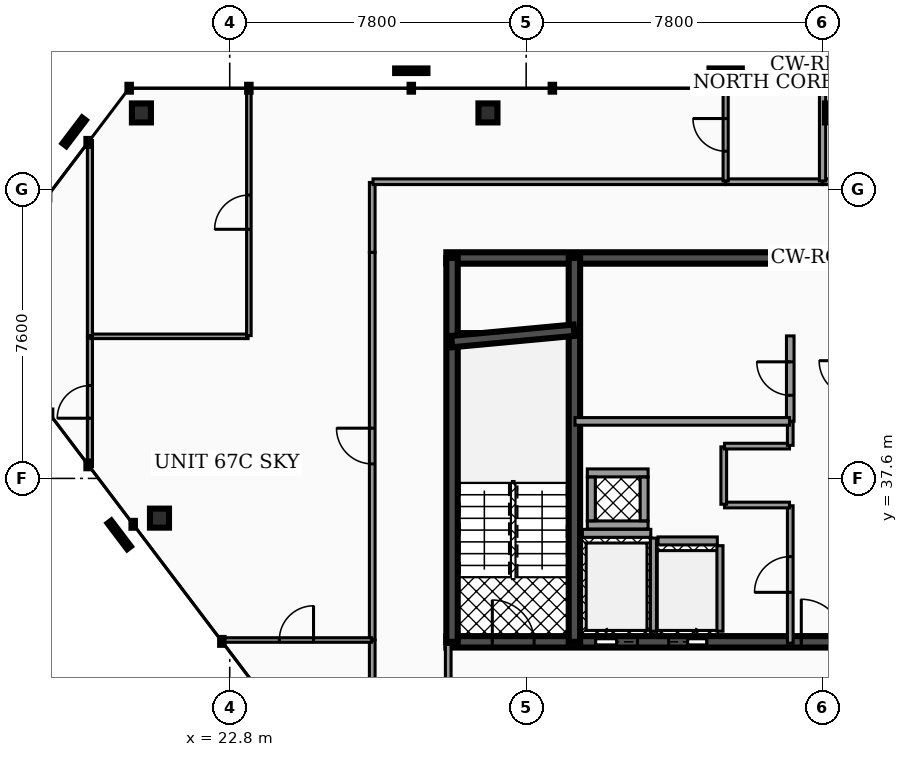
"""IFC4 building model, lengths in metres.
Left out: names, types, materials, properties, quantities, classifications, styles, units other than length and angle.
Written with IfcOpenShell. Run it as: python <this file> out.ifc"""

import sys

from ifc_helpers import new_model, si_unit, direction, frame, frame_2d, origin, origin_2d, place, context, subcontext, project, spatial, rectangle, hollow_rectangle, extrude, element, fill, save


model = new_model("IFC4")
c1 = context("Model", 3, precision=1e-05, world=origin(), true_north=direction((0.0, 1.0)))
c2 = subcontext(c1, "Body", "Model", "MODEL_VIEW")
j1 = project(units=[si_unit("LENGTHUNIT", "METRE"), si_unit("PLANEANGLEUNIT", "RADIAN")], contexts=[c1])
p1 = place(None, origin())
s1 = spatial("IfcSite", under=j1, at=p1, CompositionType="ELEMENT")
p2 = place(p1, origin())
s2 = spatial("IfcBuilding", under=s1, at=p2, CompositionType="ELEMENT")
p3 = place(p2, frame((0.0, 0.0, 265.2)))
s3 = spatial("IfcBuildingStorey", under=s2, at=p3, CompositionType="ELEMENT", Elevation=265.2)
p4 = place(p3, frame((28.5, 43.4, 0.0), z_axis=(0.0, 0.0, 1.0), x_axis=(1.0, 0.0, 0.0)))
e1 = element("IfcWall", 1, at=p4, inside=s3, PredefinedType="SHEAR", context=c2, shape_type="SweptSolid", body=[
    extrude(rectangle(XDim=19.86, YDim=0.3, at=frame_2d((9.93, 0.0))), origin(), (0.0, 0.0, 1.0), 3.18),
])
p5 = place(p3, frame((28.5, 33.3, 0.0), z_axis=(0.0, 0.0, 1.0), x_axis=(1.0, 0.0, 0.0)))
e2 = element("IfcWall", 2, at=p5, inside=s3, PredefinedType="SHEAR", context=c2, shape_type="SweptSolid", body=[
    extrude(rectangle(XDim=19.86, YDim=0.3, at=frame_2d((9.93, 0.0))), origin(), (0.0, 0.0, 1.0), 3.18),
])
p6 = place(p5, frame((3.93, 0.0, 0.0)))
e3 = element("IfcOpeningElement", 3, at=p6, cuts=e2, PredefinedType="OPENING", context=c2, shape_type="SweptSolid", body=[
    extrude(rectangle(XDim=1.1, YDim=2.15, at=frame_2d((0.55, 1.075))), frame((0.0, 0.16, 0.0), z_axis=(0.0, -1.0, 0.0), x_axis=(1.0, 0.0, 0.0)), (0.0, 0.0, 1.0), 0.32),
])
p7 = place(p5, frame((14.77, 0.0, 0.0)))
e4 = element("IfcOpeningElement", 4, at=p7, cuts=e2, PredefinedType="OPENING", context=c2, shape_type="SweptSolid", body=[
    extrude(rectangle(XDim=1.1, YDim=2.15, at=frame_2d((0.55, 1.075))), frame((0.0, 0.16, 0.0), z_axis=(0.0, -1.0, 0.0), x_axis=(1.0, 0.0, 0.0)), (0.0, 0.0, 1.0), 0.32),
])
p8 = place(p5, frame((11.25, 0.0, 0.0)))
e5 = element("IfcOpeningElement", 5, at=p8, cuts=e2, PredefinedType="OPENING", context=c2, shape_type="SweptSolid", body=[
    extrude(rectangle(XDim=1.0, YDim=2.1, at=frame_2d((0.5, 1.05))), frame((0.0, 0.16, 0.0), z_axis=(0.0, -1.0, 0.0), x_axis=(1.0, 0.0, 0.0)), (0.0, 0.0, 1.0), 0.32),
])
p9 = place(p5, frame((12.95, 0.0, 0.0)))
e6 = element("IfcOpeningElement", 6, at=p9, cuts=e2, PredefinedType="OPENING", context=c2, shape_type="SweptSolid", body=[
    extrude(rectangle(XDim=1.0, YDim=2.1, at=frame_2d((0.5, 1.05))), frame((0.0, 0.16, 0.0), z_axis=(0.0, -1.0, 0.0), x_axis=(1.0, 0.0, 0.0)), (0.0, 0.0, 1.0), 0.32),
])
p10 = place(p5, frame((5.85, 0.0, 0.0)))
e7 = element("IfcOpeningElement", 7, at=p10, cuts=e2, PredefinedType="OPENING", context=c2, shape_type="SweptSolid", body=[
    extrude(rectangle(XDim=1.0, YDim=2.1, at=frame_2d((0.5, 1.05))), frame((0.0, 0.16, 0.0), z_axis=(0.0, -1.0, 0.0), x_axis=(1.0, 0.0, 0.0)), (0.0, 0.0, 1.0), 0.32),
])
p11 = place(p5, frame((1.21, 0.0, 0.0)))
e8 = element("IfcOpeningElement", 8, at=p11, cuts=e2, PredefinedType="OPENING", context=c2, shape_type="SweptSolid", body=[
    extrude(rectangle(XDim=1.1, YDim=2.2, at=frame_2d((0.55, 1.1))), frame((0.0, 0.16, 0.0), z_axis=(0.0, -1.0, 0.0), x_axis=(1.0, 0.0, 0.0)), (0.0, 0.0, 1.0), 0.32),
])
p12 = place(p5, frame((9.34, 0.0, 0.0)))
e9 = element("IfcOpeningElement", 9, at=p12, cuts=e2, PredefinedType="OPENING", context=c2, shape_type="SweptSolid", body=[
    extrude(rectangle(XDim=1.12, YDim=2.05, at=frame_2d((0.56, 1.025))), frame((0.0, 0.16, 0.0), z_axis=(0.0, -1.0, 0.0), x_axis=(1.0, 0.0, 0.0)), (0.0, 0.0, 1.0), 0.32),
])
p13 = place(p5, frame((17.55, 0.0, 0.0)))
e10 = element("IfcOpeningElement", 10, at=p13, cuts=e2, PredefinedType="OPENING", context=c2, shape_type="SweptSolid", body=[
    extrude(rectangle(XDim=1.1, YDim=2.2, at=frame_2d((0.55, 1.1))), frame((0.0, 0.16, 0.0), z_axis=(0.0, -1.0, 0.0), x_axis=(1.0, 0.0, 0.0)), (0.0, 0.0, 1.0), 0.32),
])
for number, where, z_axis, x_axis in (
    (11, (28.65, 33.3, 0.0), (0.0, 0.0, 1.0), (0.0, 1.0, 0.0)),
    (12, (31.87, 33.3, 0.0), (0.0, 0.0, 1.0), (0.0, 1.0, 0.0)),
):
    element("IfcWall", number, at=place(p3, frame(where, z_axis=z_axis, x_axis=x_axis)), inside=s3, PredefinedType="SHEAR", context=c2, shape_type="SweptSolid", body=[
        extrude(rectangle(XDim=10.1, YDim=0.3, at=frame_2d((5.05, 0.0))), origin(), (0.0, 0.0, 1.0), 3.18),
    ])
p14 = place(p3, frame((28.64, 41.2, 0.0), z_axis=(0.0, 0.0, 1.0), x_axis=(0.995687118776, 0.092774789157, 0.0)))
e13 = element("IfcWall", 13, at=p14, inside=s3, PredefinedType="SHEAR", context=c2, shape_type="SweptSolid", body=[
    extrude(rectangle(XDim=3.234, YDim=0.3, at=frame_2d((1.617, 0.0))), origin(), (0.0, 0.0, 1.0), 3.18),
])
p15 = place(p3, frame((38.714, 47.217, 0.0), z_axis=(-0.049732120532, -0.036628588003, 0.998090708667), x_axis=(0.593029744419, -0.805180552569, 0.0)))
e14 = element("IfcColumn", 14, at=p15, inside=s3, PredefinedType="COLUMN", context=c2, shape_type="SweptSolid", body=[
    extrude(hollow_rectangle(XDim=0.5, YDim=0.5, WallThickness=0.025, at=origin_2d()), origin(), (0.0, 0.0, 1.0), 3.186),
])
p16 = place(p3, frame((29.595, 47.217, 0.0), z_axis=(-0.051413571733, -0.036625465407, 0.998005621189), x_axis=(0.580204340618, -0.814470946767, 0.0)))
e15 = element("IfcColumn", 15, at=p16, inside=s3, PredefinedType="COLUMN", context=c2, shape_type="SweptSolid", body=[
    extrude(hollow_rectangle(XDim=0.5, YDim=0.5, WallThickness=0.025, at=origin_2d()), origin(), (0.0, 0.0, 1.0), 3.186),
])
p17 = place(p3, frame((20.476, 47.217, 0.0), z_axis=(-0.05309458581, -0.036622239563, 0.997917720319), x_axis=(0.567788470093, -0.823174497436, 0.0)))
e16 = element("IfcColumn", 16, at=p17, inside=s3, PredefinedType="COLUMN", context=c2, shape_type="SweptSolid", body=[
    extrude(hollow_rectangle(XDim=0.5, YDim=0.5, WallThickness=0.025, at=origin_2d()), origin(), (0.0, 0.0, 1.0), 3.187),
])
p18 = place(p3, frame((20.952, 36.555, 0.0), z_axis=(0.068268420053, 0.121864451387, 0.990196181729), x_axis=(-0.872431759919, 0.488735945357, 0.0)))
e17 = element("IfcColumn", 17, at=p18, inside=s3, PredefinedType="COLUMN", context=c2, shape_type="SweptSolid", body=[
    extrude(hollow_rectangle(XDim=0.5, YDim=0.5, WallThickness=0.025, at=origin_2d()), origin(), (0.0, 0.0, 1.0), 3.211),
])
p19 = place(p3, frame((32.08, 36.155, 0.0), z_axis=(0.0, 0.0, 1.0), x_axis=(1.0, 0.0, 0.0)))
e18 = element("IfcWall", 18, at=p19, inside=s3, PredefinedType="SOLIDWALL", context=c2, shape_type="SweptSolid", body=[
    extrude(rectangle(XDim=1.8, YDim=0.21, at=frame_2d((0.9, 0.0))), origin(), (0.0, 0.0, 1.0), 3.18),
])
p20 = place(p3, frame((33.95, 33.58, 0.0), z_axis=(0.0, 0.0, 1.0), x_axis=(0.0, 1.0, 0.0)))
e19 = element("IfcWall", 19, at=p20, inside=s3, PredefinedType="SOLIDWALL", context=c2, shape_type="SweptSolid", body=[
    extrude(rectangle(XDim=2.45, YDim=0.16, at=frame_2d((1.225, 0.0))), origin(), (0.0, 0.0, 1.0), 3.18),
])
p21 = place(p3, frame((34.07, 35.955, 0.0), z_axis=(0.0, 0.0, 1.0), x_axis=(1.0, 0.0, 0.0)))
e20 = element("IfcWall", 20, at=p21, inside=s3, PredefinedType="SOLIDWALL", context=c2, shape_type="SweptSolid", body=[
    extrude(rectangle(XDim=1.56, YDim=0.21, at=frame_2d((0.78, 0.0))), origin(), (0.0, 0.0, 1.0), 3.18),
])
p22 = place(p3, frame((35.7, 33.58, 0.0), z_axis=(0.0, 0.0, 1.0), x_axis=(0.0, 1.0, 0.0)))
e21 = element("IfcWall", 21, at=p22, inside=s3, PredefinedType="SOLIDWALL", context=c2, shape_type="SweptSolid", body=[
    extrude(rectangle(XDim=2.25, YDim=0.16, at=frame_2d((1.125, 0.0))), origin(), (0.0, 0.0, 1.0), 3.18),
])
for number, where, z_axis, x_axis in (
    (22, (32.21, 36.375, 0.0), (0.0, 0.0, 1.0), (1.0, 0.0, 0.0)),
    (23, (32.21, 37.745, 0.0), (0.0, 0.0, 1.0), (1.0, 0.0, 0.0)),
):
    element("IfcWall", number, at=place(p3, frame(where, z_axis=z_axis, x_axis=x_axis)), inside=s3, PredefinedType="SOLIDWALL", context=c2, shape_type="SweptSolid", body=[
        extrude(rectangle(XDim=1.6, YDim=0.21, at=frame_2d((0.8, 0.0))), origin(), (0.0, 0.0, 1.0), 3.18),
    ])
for number, where, z_axis, x_axis in (
    (24, (32.315, 36.485, 0.0), (0.0, 0.0, 1.0), (0.0, 1.0, 0.0)),
    (25, (33.705, 36.485, 0.0), (0.0, 0.0, 1.0), (0.0, 1.0, 0.0)),
):
    element("IfcWall", number, at=place(p3, frame(where, z_axis=z_axis, x_axis=x_axis)), inside=s3, PredefinedType="SOLIDWALL", context=c2, shape_type="SweptSolid", body=[
        extrude(rectangle(XDim=1.15, YDim=0.21, at=frame_2d((0.575, 0.0))), origin(), (0.0, 0.0, 1.0), 3.18),
    ])
p23 = place(p3, frame((37.55, 33.265, 0.0), z_axis=(0.0, 0.0, 1.0), x_axis=(0.0, 1.0, 0.0)))
e26 = element("IfcWall", 26, at=p23, inside=s3, PredefinedType="PARTITIONING", context=c2, shape_type="SweptSolid", body=[
    extrude(rectangle(XDim=3.615, YDim=0.15, at=frame_2d((1.808, 0.0))), origin(), (0.0, 0.0, 1.0), 2.235),
])
p24 = place(p23, frame((1.337, 0.0, 0.0)))
e27 = element("IfcOpeningElement", 27, at=p24, cuts=e26, PredefinedType="OPENING", context=c2, shape_type="SweptSolid", body=[
    extrude(rectangle(XDim=0.94, YDim=2.05, at=frame_2d((0.47, 1.025))), frame((0.0, 0.085, 0.0), z_axis=(0.0, -1.0, 0.0), x_axis=(1.0, 0.0, 0.0)), (0.0, 0.0, 1.0), 0.17),
])
p25 = place(p3, frame((35.82, 36.9, 0.0), z_axis=(0.0, 0.0, 1.0), x_axis=(1.0, 0.0, 0.0)))
e28 = element("IfcWall", 28, at=p25, inside=s3, PredefinedType="PARTITIONING", context=c2, shape_type="SweptSolid", body=[
    extrude(rectangle(XDim=1.71, YDim=0.15, at=frame_2d((0.855, 0.0))), origin(), (0.0, 0.0, 1.0), 2.235),
])
p26 = place(p3, frame((35.8, 36.92, 0.0), z_axis=(0.0, 0.0, 1.0), x_axis=(0.0, 1.0, 0.0)))
e29 = element("IfcWall", 29, at=p26, inside=s3, PredefinedType="PARTITIONING", context=c2, shape_type="SweptSolid", body=[
    extrude(rectangle(XDim=1.51, YDim=0.15, at=frame_2d((0.755, 0.0))), origin(), (0.0, 0.0, 1.0), 2.235),
])
p27 = place(p3, frame((35.82, 38.45, 0.0), z_axis=(0.0, 0.0, 1.0), x_axis=(1.0, 0.0, 0.0)))
e30 = element("IfcWall", 30, at=p27, inside=s3, PredefinedType="PARTITIONING", context=c2, shape_type="SweptSolid", body=[
    extrude(rectangle(XDim=1.71, YDim=0.15, at=frame_2d((0.855, 0.0))), origin(), (0.0, 0.0, 1.0), 2.235),
])
p28 = place(p3, frame((37.55, 38.47, 0.0), z_axis=(0.0, 0.0, 1.0), x_axis=(0.0, 1.0, 0.0)))
e31 = element("IfcWall", 31, at=p28, inside=s3, PredefinedType="PARTITIONING", context=c2, shape_type="SweptSolid", body=[
    extrude(rectangle(XDim=0.625, YDim=0.15, at=frame_2d((0.312, 0.0))), origin(), (0.0, 0.0, 1.0), 2.235),
])
p29 = place(p3, frame((37.55, 39.105, 0.0), z_axis=(0.0, 0.0, 1.0), x_axis=(0.0, 1.0, 0.0)))
e32 = element("IfcWall", 32, at=p29, inside=s3, PredefinedType="PARTITIONING", context=c2, shape_type="SweptSolid", body=[
    extrude(rectangle(XDim=2.245, YDim=0.2, at=frame_2d((1.123, 0.0))), origin(), (0.0, 0.0, 1.0), 2.235),
])
p30 = place(p29, frame((0.683, 0.0, 0.0)))
e33 = element("IfcOpeningElement", 33, at=p30, cuts=e32, PredefinedType="OPENING", context=c2, shape_type="SweptSolid", body=[
    extrude(rectangle(XDim=0.88, YDim=2.05, at=frame_2d((0.44, 1.025))), frame((0.0, 0.11, 0.0), z_axis=(0.0, -1.0, 0.0), x_axis=(1.0, 0.0, 0.0)), (0.0, 0.0, 1.0), 0.22),
])
p31 = place(p3, frame((31.885, 39.1, 0.0), z_axis=(0.0, 0.0, 1.0), x_axis=(1.0, 0.0, 0.0)))
e34 = element("IfcWall", 34, at=p31, inside=s3, PredefinedType="PARTITIONING", context=c2, shape_type="SweptSolid", body=[
    extrude(rectangle(XDim=5.645, YDim=0.2, at=frame_2d((2.823, 0.0))), origin(), (0.0, 0.0, 1.0), 2.235),
])
p32 = place(p3, frame((28.55, 30.17, 0.0), z_axis=(0.0, 0.0, 1.0), x_axis=(0.0, 1.0, 0.0)))
e35 = element("IfcWall", 35, at=p32, inside=s3, PredefinedType="PARTITIONING", context=c2, shape_type="SweptSolid", body=[
    extrude(rectangle(XDim=3.06, YDim=0.15, at=frame_2d((1.53, 0.0))), origin(), (0.0, 0.0, 1.0), 2.235),
])
p33 = place(p32, frame((1.06, 0.0, 0.0)))
e36 = element("IfcOpeningElement", 36, at=p33, cuts=e35, PredefinedType="OPENING", context=c2, shape_type="SweptSolid", body=[
    extrude(rectangle(XDim=0.94, YDim=2.05, at=frame_2d((0.47, 1.025))), frame((0.0, 0.085, 0.0), z_axis=(0.0, -1.0, 0.0), x_axis=(1.0, 0.0, 0.0)), (0.0, 0.0, 1.0), 0.17),
])
p34 = place(p3, frame((26.55, 33.353, 0.0), z_axis=(0.0, 0.0, 1.0), x_axis=(0.0, 1.0, 0.0)))
e37 = element("IfcWall", 37, at=p34, inside=s3, PredefinedType="PARTITIONING", context=c2, shape_type="SweptSolid", body=[
    extrude(rectangle(XDim=10.197, YDim=0.15, at=frame_2d((5.099, 0.0))), origin(), (0.0, 0.0, 1.0), 2.235),
])
p35 = place(p34, frame((4.628, 0.0, 0.0)))
e38 = element("IfcOpeningElement", 38, at=p35, cuts=e37, PredefinedType="OPENING", context=c2, shape_type="SweptSolid", body=[
    extrude(rectangle(XDim=0.94, YDim=2.05, at=frame_2d((0.47, 1.025))), frame((0.0, 0.085, 0.0), z_axis=(0.0, -1.0, 0.0), x_axis=(1.0, 0.0, 0.0)), (0.0, 0.0, 1.0), 0.17),
])
p36 = place(p3, frame((26.55, 43.55, 0.0), z_axis=(0.0, 0.0, 1.0), x_axis=(0.0, 1.0, 0.0)))
e39 = element("IfcWall", 39, at=p36, inside=s3, PredefinedType="PARTITIONING", context=c2, shape_type="SweptSolid", body=[
    extrude(rectangle(XDim=1.837, YDim=0.15, at=frame_2d((0.918, 0.0))), origin(), (0.0, 0.0, 1.0), 2.235),
])
p37 = place(p3, frame((26.57, 45.407, 0.0), z_axis=(0.0, 0.0, 1.0), x_axis=(1.0, 0.0, 0.0)))
e40 = element("IfcWall", 40, at=p37, inside=s3, PredefinedType="PARTITIONING", context=c2, shape_type="SweptSolid", body=[
    extrude(rectangle(XDim=9.275, YDim=0.15, at=frame_2d((4.637, 0.0))), origin(), (0.0, 0.0, 1.0), 2.235),
])
p38 = place(p3, frame((35.855, 45.407, 0.0), z_axis=(0.0, 0.0, 1.0), x_axis=(1.0, 0.0, 0.0)))
e41 = element("IfcWall", 41, at=p38, inside=s3, PredefinedType="PARTITIONING", context=c2, shape_type="SweptSolid", body=[
    extrude(rectangle(XDim=2.54, YDim=0.15, at=frame_2d((1.27, 0.0))), origin(), (0.0, 0.0, 1.0), 2.235),
])
p39 = place(p3, frame((26.55, 32.183, 0.0), z_axis=(0.0, 0.0, 1.0), x_axis=(0.0, 1.0, 0.0)))
e42 = element("IfcWall", 42, at=p39, inside=s3, PredefinedType="PARTITIONING", context=c2, shape_type="SweptSolid", body=[
    extrude(rectangle(XDim=1.16, YDim=0.15, at=frame_2d((0.58, 0.0))), origin(), (0.0, 0.0, 1.0), 2.235),
])
p40 = place(p3, frame((38.405, 45.407, 0.0), z_axis=(0.0, 0.0, 1.0), x_axis=(1.0, 0.0, 0.0)))
e43 = element("IfcWall", 43, at=p40, inside=s3, PredefinedType="PARTITIONING", context=c2, shape_type="SweptSolid", body=[
    extrude(rectangle(XDim=2.54, YDim=0.15, at=frame_2d((1.27, 0.0))), origin(), (0.0, 0.0, 1.0), 2.235),
])
p41 = place(p3, frame((19.122, 37.909, 0.0), z_axis=(0.0, 0.0, 1.0), x_axis=(0.0, 1.0, 0.0)))
e44 = element("IfcWall", 44, at=p41, inside=s3, PredefinedType="PARTITIONING", context=c2, shape_type="SweptSolid", body=[
    extrude(rectangle(XDim=3.409, YDim=0.135, at=frame_2d((1.705, 0.0))), origin(), (0.0, 0.0, 1.0), 2.235),
])
p42 = place(p41, frame((1.275, 0.0, 0.0)))
e45 = element("IfcOpeningElement", 45, at=p42, cuts=e44, PredefinedType="OPENING", context=c2, shape_type="SweptSolid", body=[
    extrude(rectangle(XDim=0.86, YDim=2.05, at=frame_2d((0.43, 1.025))), frame((0.0, 0.077, 0.0), z_axis=(0.0, -1.0, 0.0), x_axis=(1.0, 0.0, 0.0)), (0.0, 0.0, 1.0), 0.155),
])
p43 = place(p3, frame((35.85, 45.427, 0.0), z_axis=(0.0, 0.0, 1.0), x_axis=(0.0, 1.0, 0.0)))
e46 = element("IfcWall", 46, at=p43, inside=s3, PredefinedType="PARTITIONING", context=c2, shape_type="SweptSolid", body=[
    extrude(rectangle(XDim=2.425, YDim=0.135, at=frame_2d((1.212, 0.0))), origin(), (0.0, 0.0, 1.0), 2.235),
])
p44 = place(p43, frame((0.782, 0.0, 0.0)))
e47 = element("IfcOpeningElement", 47, at=p44, cuts=e46, PredefinedType="OPENING", context=c2, shape_type="SweptSolid", body=[
    extrude(rectangle(XDim=0.86, YDim=2.05, at=frame_2d((0.43, 1.025))), frame((0.0, 0.077, 0.0), z_axis=(0.0, -1.0, 0.0), x_axis=(1.0, 0.0, 0.0)), (0.0, 0.0, 1.0), 0.155),
])
p45 = place(p3, frame((19.142, 41.338, 0.0), z_axis=(0.0, 0.0, 1.0), x_axis=(1.0, 0.0, 0.0)))
e48 = element("IfcWall", 48, at=p45, inside=s3, PredefinedType="PARTITIONING", context=c2, shape_type="SweptSolid", body=[
    extrude(rectangle(XDim=4.142, YDim=0.12, at=frame_2d((2.071, 0.0))), origin(), (0.0, 0.0, 1.0), 2.235),
])
p46 = place(p3, frame((23.304, 41.358, 0.0), z_axis=(0.0, 0.0, 1.0), x_axis=(0.0, 1.0, 0.0)))
e49 = element("IfcWall", 49, at=p46, inside=s3, PredefinedType="PARTITIONING", context=c2, shape_type="SweptSolid", body=[
    extrude(rectangle(XDim=6.493, YDim=0.12, at=frame_2d((3.247, 0.0))), origin(), (0.0, 0.0, 1.0), 2.235),
])
p47 = place(p46, frame((2.797, 0.0, 0.0)))
e50 = element("IfcOpeningElement", 50, at=p47, cuts=e49, PredefinedType="OPENING", context=c2, shape_type="SweptSolid", body=[
    extrude(rectangle(XDim=0.9, YDim=2.05, at=frame_2d((0.45, 1.025))), frame((0.0, 0.07, 0.0), z_axis=(0.0, -1.0, 0.0), x_axis=(1.0, 0.0, 0.0)), (0.0, 0.0, 1.0), 0.14),
])
p48 = place(p3, frame((22.581, 33.348, 0.0), z_axis=(0.0, 0.0, 1.0), x_axis=(1.0, 0.0, 0.0)))
e51 = element("IfcWall", 51, at=p48, inside=s3, PredefinedType="PARTITIONING", context=c2, shape_type="SweptSolid", body=[
    extrude(rectangle(XDim=3.949, YDim=0.12, at=frame_2d((1.975, 0.0))), origin(), (0.0, 0.0, 1.0), 2.235),
])
p49 = place(p48, frame((1.525, 0.0, 0.0)))
e52 = element("IfcOpeningElement", 52, at=p49, cuts=e51, PredefinedType="OPENING", context=c2, shape_type="SweptSolid", body=[
    extrude(rectangle(XDim=0.9, YDim=2.05, at=frame_2d((0.45, 1.025))), frame((0.0, 0.07, 0.0), z_axis=(0.0, -1.0, 0.0), x_axis=(1.0, 0.0, 0.0)), (0.0, 0.0, 1.0), 0.14),
])
p50 = place(p3, frame((19.122, 41.358, 0.0), z_axis=(0.0, 0.0, 1.0), x_axis=(0.0, 1.0, 0.0)))
e53 = element("IfcWall", 53, at=p50, inside=s3, PredefinedType="PARTITIONING", context=c2, shape_type="SweptSolid", body=[
    extrude(rectangle(XDim=5.131, YDim=0.135, at=frame_2d((2.566, 0.0))), origin(), (0.0, 0.0, 1.0), 2.235),
])
p51 = place(p3, frame((38.4, 45.427, 0.0), z_axis=(0.0, 0.0, 1.0), x_axis=(0.0, 1.0, 0.0)))
e54 = element("IfcWall", 54, at=p51, inside=s3, PredefinedType="PARTITIONING", context=c2, shape_type="SweptSolid", body=[
    extrude(rectangle(XDim=2.425, YDim=0.165, at=frame_2d((1.212, 0.0))), origin(), (0.0, 0.0, 1.0), 2.235),
])
p52 = place(p6, origin())
e55 = element("IfcDoor", 55, at=p52, inside=s3, OperationType="SLIDING_TO_LEFT", PredefinedType="DOOR", context=c2, shape_type="SweptSolid", body=[
    extrude(rectangle(XDim=1.1, YDim=2.15, at=frame_2d((0.55, 1.075))), frame((0.0, 0.025, 0.0), z_axis=(0.0, -1.0, 0.0), x_axis=(1.0, 0.0, 0.0)), (0.0, 0.0, 1.0), 0.05),
])
fill(e3, e55)
p53 = place(p10, origin())
e56 = element("IfcDoor", 56, at=p53, inside=s3, OperationType="SLIDING_TO_RIGHT", PredefinedType="DOOR", context=c2, shape_type="SweptSolid", body=[
    extrude(rectangle(XDim=1.0, YDim=2.1, at=frame_2d((0.5, 1.05))), frame((0.0, 0.025, 0.0), z_axis=(0.0, -1.0, 0.0), x_axis=(1.0, 0.0, 0.0)), (0.0, 0.0, 1.0), 0.05),
])
fill(e7, e56)
p54 = place(p11, origin())
e57 = element("IfcDoor", 57, at=p54, inside=s3, OperationType="SINGLE_SWING_LEFT", PredefinedType="DOOR", context=c2, shape_type="SweptSolid", body=[
    extrude(rectangle(XDim=1.1, YDim=2.2, at=frame_2d((0.55, 1.1))), frame((0.0, 0.025, 0.0), z_axis=(0.0, -1.0, 0.0), x_axis=(1.0, 0.0, 0.0)), (0.0, 0.0, 1.0), 0.05),
])
fill(e8, e57)
p55 = place(p12, origin())
e58 = element("IfcDoor", 58, at=p55, inside=s3, OperationType="SINGLE_SWING_LEFT", PredefinedType="DOOR", context=c2, shape_type="SweptSolid", body=[
    extrude(rectangle(XDim=1.12, YDim=2.05, at=frame_2d((0.56, 1.025))), frame((0.0, 0.025, 0.0), z_axis=(0.0, -1.0, 0.0), x_axis=(1.0, 0.0, 0.0)), (0.0, 0.0, 1.0), 0.05),
])
fill(e9, e58)
p56 = place(p24, origin())
e59 = element("IfcDoor", 59, at=p56, inside=s3, OperationType="SINGLE_SWING_LEFT", PredefinedType="DOOR", context=c2, shape_type="SweptSolid", body=[
    extrude(rectangle(XDim=0.94, YDim=2.05, at=frame_2d((0.47, 1.025))), frame((0.0, 0.025, 0.0), z_axis=(0.0, -1.0, 0.0), x_axis=(1.0, 0.0, 0.0)), (0.0, 0.0, 1.0), 0.05),
])
fill(e27, e59)
p57 = place(p30, origin())
e60 = element("IfcDoor", 60, at=p57, inside=s3, OperationType="SINGLE_SWING_RIGHT", PredefinedType="DOOR", context=c2, shape_type="SweptSolid", body=[
    extrude(rectangle(XDim=0.88, YDim=2.05, at=frame_2d((0.44, 1.025))), frame((0.0, 0.025, 0.0), z_axis=(0.0, -1.0, 0.0), x_axis=(1.0, 0.0, 0.0)), (0.0, 0.0, 1.0), 0.05),
])
fill(e33, e60)
p58 = place(p35, origin())
e61 = element("IfcDoor", 61, at=p58, inside=s3, OperationType="SINGLE_SWING_RIGHT", PredefinedType="DOOR", context=c2, shape_type="SweptSolid", body=[
    extrude(rectangle(XDim=0.94, YDim=2.05, at=frame_2d((0.47, 1.025))), frame((0.0, 0.025, 0.0), z_axis=(0.0, -1.0, 0.0), x_axis=(1.0, 0.0, 0.0)), (0.0, 0.0, 1.0), 0.05),
])
fill(e38, e61)
p59 = place(p42, origin())
e62 = element("IfcDoor", 62, at=p59, inside=s3, OperationType="SINGLE_SWING_LEFT", PredefinedType="DOOR", context=c2, shape_type="SweptSolid", body=[
    extrude(rectangle(XDim=0.86, YDim=2.05, at=frame_2d((0.43, 1.025))), frame((0.0, 0.025, 0.0), z_axis=(0.0, -1.0, 0.0), x_axis=(1.0, 0.0, 0.0)), (0.0, 0.0, 1.0), 0.05),
])
fill(e45, e62)
p60 = place(p44, origin())
e63 = element("IfcDoor", 63, at=p60, inside=s3, OperationType="SINGLE_SWING_RIGHT", PredefinedType="DOOR", context=c2, shape_type="SweptSolid", body=[
    extrude(rectangle(XDim=0.86, YDim=2.05, at=frame_2d((0.43, 1.025))), frame((0.0, 0.025, 0.0), z_axis=(0.0, -1.0, 0.0), x_axis=(1.0, 0.0, 0.0)), (0.0, 0.0, 1.0), 0.05),
])
fill(e47, e63)
p61 = place(p47, origin())
e64 = element("IfcDoor", 64, at=p61, inside=s3, OperationType="SINGLE_SWING_LEFT", PredefinedType="DOOR", context=c2, shape_type="SweptSolid", body=[
    extrude(rectangle(XDim=0.9, YDim=2.05, at=frame_2d((0.45, 1.025))), frame((0.0, 0.025, 0.0), z_axis=(0.0, -1.0, 0.0), x_axis=(1.0, 0.0, 0.0)), (0.0, 0.0, 1.0), 0.05),
])
fill(e50, e64)
p62 = place(p49, origin())
e65 = element("IfcDoor", 65, at=p62, inside=s3, OperationType="SINGLE_SWING_RIGHT", PredefinedType="DOOR", context=c2, shape_type="SweptSolid", body=[
    extrude(rectangle(XDim=0.9, YDim=2.05, at=frame_2d((0.45, 1.025))), frame((0.0, 0.025, 0.0), z_axis=(0.0, -1.0, 0.0), x_axis=(1.0, 0.0, 0.0)), (0.0, 0.0, 1.0), 0.05),
])
fill(e52, e65)
save(model, sys.argv[1])
